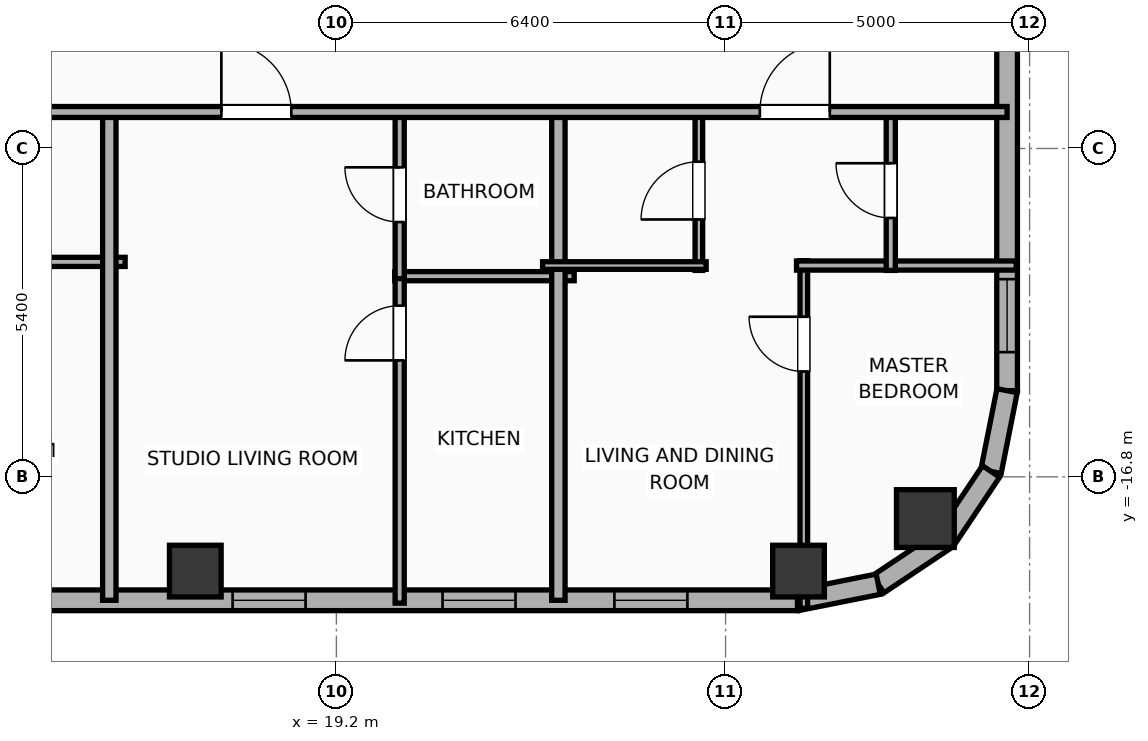
"""IFC4 building model, lengths in metres.
Left out: names, types, materials, properties, quantities, classifications, styles, units other than length and angle.
Written with IfcOpenShell. Run it as: python <this file> out.ifc"""

import sys

from ifc_helpers import new_model, si_unit, direction, frame, frame_2d, origin, origin_2d, place, context, subcontext, project, spatial, rectangle, hollow_rectangle, hollow_circle, extrude, element, fill, save


model = new_model("IFC4")
c1 = context("Model", 3, precision=1e-05, world=origin(), true_north=direction((0.0, 1.0)))
c2 = subcontext(c1, "Body", "Model", "MODEL_VIEW")
j1 = project(units=[si_unit("LENGTHUNIT", "METRE"), si_unit("PLANEANGLEUNIT", "RADIAN")], contexts=[c1])
p1 = place(None, origin())
s1 = spatial("IfcSite", under=j1, at=p1, CompositionType="ELEMENT")
p2 = place(p1, origin())
s2 = spatial("IfcBuilding", under=s1, at=p2, CompositionType="ELEMENT")
p3 = place(p2, frame((0.0, 0.0, 223.6)))
s3 = spatial("IfcBuildingStorey", under=s2, at=p3, CompositionType="ELEMENT", Elevation=223.6)
for number, where, z_axis, x_axis in (
    (1, (16.88, -18.35, 0.0), (0.0, 0.0, 1.0), (1.0, 0.0, 0.0)),
    (2, (26.8, -18.35, 0.0), (0.0, 0.0, 1.0), (1.0, 0.0, 0.0)),
):
    element("IfcColumn", number, at=place(p3, frame(where, z_axis=z_axis, x_axis=x_axis)), inside=s3, PredefinedType="COLUMN", context=c2, shape_type="SweptSolid", body=[
        extrude(hollow_rectangle(XDim=0.85, YDim=0.85, WallThickness=0.028, at=origin_2d()), origin(), (0.0, 0.0, 1.0), 3.9),
    ])
p4 = place(p3, frame((28.886, -17.486, 0.0), z_axis=(0.0, 0.0, 1.0), x_axis=(1.0, 0.0, 0.0)))
e3 = element("IfcColumn", 3, at=p4, inside=s3, PredefinedType="COLUMN", context=c2, shape_type="SweptSolid", body=[
    extrude(hollow_circle(Radius=0.475, WallThickness=0.032, at=origin_2d()), origin(), (0.0, 0.0, 1.0), 3.9),
])
p5 = place(p3, frame((26.783, -18.83, 0.0), z_axis=(0.0, 0.0, 1.0), x_axis=(-1.0, 0.0, 0.0)))
e4 = element("IfcWall", 4, at=p5, inside=s3, PredefinedType="ELEMENTEDWALL", context=c2, shape_type="SweptSolid", body=[
    extrude(rectangle(XDim=49.566, YDim=0.34, at=frame_2d((24.783, 0.0))), origin(), (0.0, 0.0, 1.0), 3.65),
])
p6 = place(p5, frame((23.583, 0.0, 0.75)))
e5 = element("IfcOpeningElement", 5, at=p6, cuts=e4, PredefinedType="OPENING", context=c2, shape_type="SweptSolid", body=[
    extrude(rectangle(XDim=2.4, YDim=2.1, at=frame_2d((1.2, 1.05))), frame((0.0, 0.18, 0.0), z_axis=(0.0, -1.0, 0.0), x_axis=(1.0, 0.0, 0.0)), (0.0, 0.0, 1.0), 0.36),
])
p7 = place(p5, frame((41.756, 0.0, 0.75)))
e6 = element("IfcOpeningElement", 6, at=p7, cuts=e4, PredefinedType="OPENING", context=c2, shape_type="SweptSolid", body=[
    extrude(rectangle(XDim=2.4, YDim=2.1, at=frame_2d((1.2, 1.05))), frame((0.0, 0.18, 0.0), z_axis=(0.0, -1.0, 0.0), x_axis=(1.0, 0.0, 0.0)), (0.0, 0.0, 1.0), 0.36),
])
p8 = place(p5, frame((47.222, 0.0, 0.75)))
e7 = element("IfcOpeningElement", 7, at=p8, cuts=e4, PredefinedType="OPENING", context=c2, shape_type="SweptSolid", body=[
    extrude(rectangle(XDim=1.2, YDim=2.05, at=frame_2d((0.6, 1.025))), frame((0.0, 0.18, 0.0), z_axis=(0.0, -1.0, 0.0), x_axis=(1.0, 0.0, 0.0)), (0.0, 0.0, 1.0), 0.36),
])
p9 = place(p5, frame((45.08, 0.0, 0.75)))
e8 = element("IfcOpeningElement", 8, at=p9, cuts=e4, PredefinedType="OPENING", context=c2, shape_type="SweptSolid", body=[
    extrude(rectangle(XDim=1.2, YDim=2.05, at=frame_2d((0.6, 1.025))), frame((0.0, 0.18, 0.0), z_axis=(0.0, -1.0, 0.0), x_axis=(1.0, 0.0, 0.0)), (0.0, 0.0, 1.0), 0.36),
])
p10 = place(p5, frame((37.289, 0.0, 0.75)))
e9 = element("IfcOpeningElement", 9, at=p10, cuts=e4, PredefinedType="OPENING", context=c2, shape_type="SweptSolid", body=[
    extrude(rectangle(XDim=1.2, YDim=2.05, at=frame_2d((0.6, 1.025))), frame((0.0, 0.18, 0.0), z_axis=(0.0, -1.0, 0.0), x_axis=(1.0, 0.0, 0.0)), (0.0, 0.0, 1.0), 0.36),
])
p11 = place(p5, frame((16.115, 0.0, 0.75)))
e10 = element("IfcOpeningElement", 10, at=p11, cuts=e4, PredefinedType="OPENING", context=c2, shape_type="SweptSolid", body=[
    extrude(rectangle(XDim=1.2, YDim=2.05, at=frame_2d((0.6, 1.025))), frame((0.0, 0.18, 0.0), z_axis=(0.0, -1.0, 0.0), x_axis=(1.0, 0.0, 0.0)), (0.0, 0.0, 1.0), 0.36),
])
p12 = place(p5, frame((12.422, 0.0, 0.75)))
e11 = element("IfcOpeningElement", 11, at=p12, cuts=e4, PredefinedType="OPENING", context=c2, shape_type="SweptSolid", body=[
    extrude(rectangle(XDim=1.2, YDim=2.05, at=frame_2d((0.6, 1.025))), frame((0.0, 0.18, 0.0), z_axis=(0.0, -1.0, 0.0), x_axis=(1.0, 0.0, 0.0)), (0.0, 0.0, 1.0), 0.36),
])
p13 = place(p5, frame((8.09, 0.0, 0.75)))
e12 = element("IfcOpeningElement", 12, at=p13, cuts=e4, PredefinedType="OPENING", context=c2, shape_type="SweptSolid", body=[
    extrude(rectangle(XDim=1.2, YDim=2.05, at=frame_2d((0.6, 1.025))), frame((0.0, 0.18, 0.0), z_axis=(0.0, -1.0, 0.0), x_axis=(1.0, 0.0, 0.0)), (0.0, 0.0, 1.0), 0.36),
])
p14 = place(p5, frame((4.637, 0.0, 0.75)))
e13 = element("IfcOpeningElement", 13, at=p14, cuts=e4, PredefinedType="OPENING", context=c2, shape_type="SweptSolid", body=[
    extrude(rectangle(XDim=1.2, YDim=2.05, at=frame_2d((0.6, 1.025))), frame((0.0, 0.18, 0.0), z_axis=(0.0, -1.0, 0.0), x_axis=(1.0, 0.0, 0.0)), (0.0, 0.0, 1.0), 0.36),
])
p15 = place(p5, frame((1.811, 0.0, 0.75)))
e14 = element("IfcOpeningElement", 14, at=p15, cuts=e4, PredefinedType="OPENING", context=c2, shape_type="SweptSolid", body=[
    extrude(rectangle(XDim=1.2, YDim=2.05, at=frame_2d((0.6, 1.025))), frame((0.0, 0.18, 0.0), z_axis=(0.0, -1.0, 0.0), x_axis=(1.0, 0.0, 0.0)), (0.0, 0.0, 1.0), 0.36),
])
p16 = place(p5, frame((32.253, 0.0, 0.75)))
e15 = element("IfcOpeningElement", 15, at=p16, cuts=e4, PredefinedType="OPENING", context=c2, shape_type="SweptSolid", body=[
    extrude(rectangle(XDim=1.2, YDim=2.05, at=frame_2d((0.6, 1.025))), frame((0.0, 0.18, 0.0), z_axis=(0.0, -1.0, 0.0), x_axis=(1.0, 0.0, 0.0)), (0.0, 0.0, 1.0), 0.36),
])
p17 = place(p5, frame((27.853, 0.0, 0.75)))
e16 = element("IfcOpeningElement", 16, at=p17, cuts=e4, PredefinedType="OPENING", context=c2, shape_type="SweptSolid", body=[
    extrude(rectangle(XDim=1.2, YDim=2.05, at=frame_2d((0.6, 1.025))), frame((0.0, 0.18, 0.0), z_axis=(0.0, -1.0, 0.0), x_axis=(1.0, 0.0, 0.0)), (0.0, 0.0, 1.0), 0.36),
])
p18 = place(p5, frame((20.473, 0.0, 0.75)))
e17 = element("IfcOpeningElement", 17, at=p18, cuts=e4, PredefinedType="OPENING", context=c2, shape_type="SweptSolid", body=[
    extrude(rectangle(XDim=1.2, YDim=2.05, at=frame_2d((0.6, 1.025))), frame((0.0, 0.18, 0.0), z_axis=(0.0, -1.0, 0.0), x_axis=(1.0, 0.0, 0.0)), (0.0, 0.0, 1.0), 0.36),
])
p19 = place(p3, frame((30.23, 16.583, 0.0), z_axis=(0.0, 0.0, 1.0), x_axis=(0.0, -1.0, 0.0)))
e18 = element("IfcWall", 18, at=p19, inside=s3, PredefinedType="ELEMENTEDWALL", context=c2, shape_type="SweptSolid", body=[
    extrude(rectangle(XDim=31.967, YDim=0.34, at=frame_2d((15.983, 0.0))), origin(), (0.0, 0.0, 1.0), 3.65),
])
p20 = place(p19, frame((30.132, 0.0, 0.75)))
e19 = element("IfcOpeningElement", 19, at=p20, cuts=e18, PredefinedType="OPENING", context=c2, shape_type="SweptSolid", body=[
    extrude(rectangle(XDim=1.2, YDim=2.05, at=frame_2d((0.6, 1.025))), frame((0.0, 0.18, 0.0), z_axis=(0.0, -1.0, 0.0), x_axis=(1.0, 0.0, 0.0)), (0.0, 0.0, 1.0), 0.36),
])
p21 = place(p19, frame((11.288, 0.0, 0.75)))
e20 = element("IfcOpeningElement", 20, at=p21, cuts=e18, PredefinedType="OPENING", context=c2, shape_type="SweptSolid", body=[
    extrude(rectangle(XDim=1.2, YDim=2.05, at=frame_2d((0.6, 1.025))), frame((0.0, 0.18, 0.0), z_axis=(0.0, -1.0, 0.0), x_axis=(1.0, 0.0, 0.0)), (0.0, 0.0, 1.0), 0.36),
])
p22 = place(p19, frame((20.538, 0.0, 0.75)))
e21 = element("IfcOpeningElement", 21, at=p22, cuts=e18, PredefinedType="OPENING", context=c2, shape_type="SweptSolid", body=[
    extrude(rectangle(XDim=1.2, YDim=2.05, at=frame_2d((0.6, 1.025))), frame((0.0, 0.18, 0.0), z_axis=(0.0, -1.0, 0.0), x_axis=(1.0, 0.0, 0.0)), (0.0, 0.0, 1.0), 0.36),
])
p23 = place(p3, frame((30.23, -15.383, 0.0), z_axis=(0.0, 0.0, 1.0), x_axis=(-0.195110379894, -0.98078129043, 0.0)))
e22 = element("IfcWall", 22, at=p23, inside=s3, PredefinedType="ELEMENTEDWALL", context=c2, shape_type="SweptSolid", body=[
    extrude(rectangle(XDim=1.354, YDim=0.34, at=frame_2d((0.677, 0.0))), origin(), (0.0, 0.0, 1.0), 3.65),
])
p24 = place(p3, frame((29.966, -16.711, 0.0), z_axis=(0.0, 0.0, 1.0), x_axis=(-0.555584683399, -0.831459956686, 0.0)))
e23 = element("IfcWall", 23, at=p24, inside=s3, PredefinedType="ELEMENTEDWALL", context=c2, shape_type="SweptSolid", body=[
    extrude(rectangle(XDim=1.337, YDim=0.34, at=frame_2d((0.668, 0.0))), origin(), (0.0, 0.0, 1.0), 3.65),
])
p25 = place(p3, frame((29.223, -17.823, 0.0), z_axis=(0.0, 0.0, 1.0), x_axis=(-0.831403586725, -0.555669034571, 0.0)))
e24 = element("IfcWall", 24, at=p25, inside=s3, PredefinedType="ELEMENTEDWALL", context=c2, shape_type="SweptSolid", body=[
    extrude(rectangle(XDim=1.337, YDim=0.34, at=frame_2d((0.668, 0.0))), origin(), (0.0, 0.0, 1.0), 3.65),
])
p26 = place(p3, frame((28.111, -18.566, 0.0), z_axis=(0.0, 0.0, 1.0), x_axis=(-0.980788153188, -0.195075878998, 0.0)))
e25 = element("IfcWall", 25, at=p26, inside=s3, PredefinedType="ELEMENTEDWALL", context=c2, shape_type="SweptSolid", body=[
    extrude(rectangle(XDim=1.354, YDim=0.34, at=frame_2d((0.677, 0.0))), origin(), (0.0, 0.0, 1.0), 3.65),
])
p27 = place(p3, frame((11.936, -13.265, 0.0), z_axis=(0.0, 0.0, 1.0), x_axis=(1.0, 0.0, 0.0)))
e26 = element("IfcWall", 26, at=p27, inside=s3, PredefinedType="PLUMBINGWALL", context=c2, shape_type="SweptSolid", body=[
    extrude(rectangle(XDim=3.79, YDim=0.15, at=frame_2d((1.895, 0.0))), origin(), (0.0, 0.0, 1.0), 3.65),
])
p28 = place(p3, frame((15.466, -18.83, 0.0), z_axis=(0.0, 0.0, 1.0), x_axis=(0.0, 1.0, 0.0)))
e27 = element("IfcWall", 27, at=p28, inside=s3, PredefinedType="PARTITIONING", context=c2, shape_type="SweptSolid", body=[
    extrude(rectangle(XDim=8.11, YDim=0.22, at=frame_2d((4.055, 0.0))), origin(), (0.0, 0.0, 1.0), 3.65),
])
p29 = place(p3, frame((20.161, -13.5, 0.0), z_axis=(0.0, 0.0, 1.0), x_axis=(1.0, 0.0, 0.0)))
e28 = element("IfcWall", 28, at=p29, inside=s3, PredefinedType="PLUMBINGWALL", context=c2, shape_type="SweptSolid", body=[
    extrude(rectangle(XDim=2.95, YDim=0.15, at=frame_2d((1.475, 0.0))), origin(), (0.0, 0.0, 1.0), 3.65),
])
p30 = place(p3, frame((20.241, -18.877, 0.0), z_axis=(0.0, 0.0, 1.0), x_axis=(0.0, 1.0, 0.0)))
e29 = element("IfcWall", 29, at=p30, inside=s3, PredefinedType="PLUMBINGWALL", context=c2, shape_type="SweptSolid", body=[
    extrude(rectangle(XDim=5.417, YDim=0.15, at=frame_2d((2.708, 0.0))), origin(), (0.0, 0.0, 1.0), 3.65),
])
p31 = place(p30, frame((3.992, 0.0, 0.0)))
e30 = element("IfcOpeningElement", 30, at=p31, cuts=e29, PredefinedType="OPENING", context=c2, shape_type="SweptSolid", body=[
    extrude(rectangle(XDim=0.9, YDim=2.05, at=frame_2d((0.45, 1.025))), frame((0.0, 0.085, 0.0), z_axis=(0.0, -1.0, 0.0), x_axis=(1.0, 0.0, 0.0)), (0.0, 0.0, 1.0), 0.17),
])
p32 = place(p3, frame((20.241, -13.54, 0.0), z_axis=(0.0, 0.0, 1.0), x_axis=(0.0, 1.0, 0.0)))
e31 = element("IfcWall", 31, at=p32, inside=s3, PredefinedType="PLUMBINGWALL", context=c2, shape_type="SweptSolid", body=[
    extrude(rectangle(XDim=2.76, YDim=0.15, at=frame_2d((1.38, 0.0))), origin(), (0.0, 0.0, 1.0), 3.65),
])
p33 = place(p32, frame((0.93, 0.0, 0.0)))
e32 = element("IfcOpeningElement", 32, at=p33, cuts=e31, PredefinedType="OPENING", context=c2, shape_type="SweptSolid", body=[
    extrude(rectangle(XDim=0.9, YDim=2.05, at=frame_2d((0.45, 1.025))), frame((0.0, 0.085, 0.0), z_axis=(0.0, -1.0, 0.0), x_axis=(1.0, 0.0, 0.0)), (0.0, 0.0, 1.0), 0.17),
])
p34 = place(p3, frame((22.851, -18.83, 0.0), z_axis=(0.0, 0.0, 1.0), x_axis=(0.0, 1.0, 0.0)))
e33 = element("IfcWall", 33, at=p34, inside=s3, PredefinedType="PARTITIONING", context=c2, shape_type="SweptSolid", body=[
    extrude(rectangle(XDim=8.11, YDim=0.22, at=frame_2d((4.055, 0.0))), origin(), (0.0, 0.0, 1.0), 3.65),
])
p35 = place(p3, frame((26.887, -18.962, 0.0), z_axis=(0.0, 0.0, 1.0), x_axis=(0.0, 1.0, 0.0)))
e34 = element("IfcWall", 34, at=p35, inside=s3, PredefinedType="PARTITIONING", context=c2, shape_type="SweptSolid", body=[
    extrude(rectangle(XDim=5.717, YDim=0.125, at=frame_2d((2.859, 0.0))), origin(), (0.0, 0.0, 1.0), 3.65),
])
p36 = place(p35, frame((3.895, 0.0, 0.0)))
e35 = element("IfcOpeningElement", 35, at=p36, cuts=e34, PredefinedType="OPENING", context=c2, shape_type="SweptSolid", body=[
    extrude(rectangle(XDim=0.9, YDim=2.05, at=frame_2d((0.45, 1.025))), frame((0.0, 0.073, 0.0), z_axis=(0.0, -1.0, 0.0), x_axis=(1.0, 0.0, 0.0)), (0.0, 0.0, 1.0), 0.145),
])
p37 = place(p3, frame((26.767, -13.325, 0.0), z_axis=(0.0, 0.0, 1.0), x_axis=(1.0, 0.0, 0.0)))
e36 = element("IfcWall", 36, at=p37, inside=s3, PredefinedType="PLUMBINGWALL", context=c2, shape_type="SweptSolid", body=[
    extrude(rectangle(XDim=3.613, YDim=0.15, at=frame_2d((1.806, 0.0))), origin(), (0.0, 0.0, 1.0), 3.65),
])
p38 = place(p3, frame((25.161, -13.405, 0.0), z_axis=(0.0, 0.0, 1.0), x_axis=(0.0, 1.0, 0.0)))
e37 = element("IfcWall", 37, at=p38, inside=s3, PredefinedType="PARTITIONING", context=c2, shape_type="SweptSolid", body=[
    extrude(rectangle(XDim=2.625, YDim=0.125, at=frame_2d((1.312, 0.0))), origin(), (0.0, 0.0, 1.0), 3.65),
])
p39 = place(p38, frame((0.837, 0.0, 0.0)))
e38 = element("IfcOpeningElement", 38, at=p39, cuts=e37, PredefinedType="OPENING", context=c2, shape_type="SweptSolid", body=[
    extrude(rectangle(XDim=0.95, YDim=2.05, at=frame_2d((0.475, 1.025))), frame((0.0, 0.073, 0.0), z_axis=(0.0, -1.0, 0.0), x_axis=(1.0, 0.0, 0.0)), (0.0, 0.0, 1.0), 0.145),
])
p40 = place(p3, frame((22.591, -13.325, 0.0), z_axis=(0.0, 0.0, 1.0), x_axis=(1.0, 0.0, 0.0)))
e39 = element("IfcWall", 39, at=p40, inside=s3, PredefinedType="PARTITIONING", context=c2, shape_type="SweptSolid", body=[
    extrude(rectangle(XDim=2.69, YDim=0.125, at=frame_2d((1.345, 0.0))), origin(), (0.0, 0.0, 1.0), 3.65),
])
p41 = place(p3, frame((28.317, -13.405, 0.0), z_axis=(0.0, 0.0, 1.0), x_axis=(0.0, 1.0, 0.0)))
e40 = element("IfcWall", 40, at=p41, inside=s3, PredefinedType="PLUMBINGWALL", context=c2, shape_type="SweptSolid", body=[
    extrude(rectangle(XDim=2.625, YDim=0.15, at=frame_2d((1.312, 0.0))), origin(), (0.0, 0.0, 1.0), 3.65),
])
p42 = place(p41, frame((0.863, 0.0, 0.0)))
e41 = element("IfcOpeningElement", 41, at=p42, cuts=e40, PredefinedType="OPENING", context=c2, shape_type="SweptSolid", body=[
    extrude(rectangle(XDim=0.9, YDim=2.05, at=frame_2d((0.45, 1.025))), frame((0.0, 0.085, 0.0), z_axis=(0.0, -1.0, 0.0), x_axis=(1.0, 0.0, 0.0)), (0.0, 0.0, 1.0), 0.17),
])
p43 = place(p3, frame((8.08, -10.8, 0.0), z_axis=(0.0, 0.0, 1.0), x_axis=(1.0, 0.0, 0.0)))
e42 = element("IfcWall", 42, at=p43, inside=s3, PredefinedType="PARTITIONING", context=c2, shape_type="SweptSolid", body=[
    extrude(rectangle(XDim=22.15, YDim=0.18, at=frame_2d((11.075, 0.0))), origin(), (0.0, 0.0, 1.0), 3.65),
])
p44 = place(p43, frame((3.283, 0.0, 0.0)))
e43 = element("IfcOpeningElement", 43, at=p44, cuts=e42, PredefinedType="OPENING", context=c2, shape_type="SweptSolid", body=[
    extrude(rectangle(XDim=1.15, YDim=2.05, at=frame_2d((0.575, 1.025))), frame((0.0, 0.1, 0.0), z_axis=(0.0, -1.0, 0.0), x_axis=(1.0, 0.0, 0.0)), (0.0, 0.0, 1.0), 0.2),
])
p45 = place(p43, frame((9.229, 0.0, 0.0)))
e44 = element("IfcOpeningElement", 44, at=p45, cuts=e42, PredefinedType="OPENING", context=c2, shape_type="SweptSolid", body=[
    extrude(rectangle(XDim=1.15, YDim=2.05, at=frame_2d((0.575, 1.025))), frame((0.0, 0.1, 0.0), z_axis=(0.0, -1.0, 0.0), x_axis=(1.0, 0.0, 0.0)), (0.0, 0.0, 1.0), 0.2),
])
p46 = place(p43, frame((18.084, 0.0, 0.0)))
e45 = element("IfcOpeningElement", 45, at=p46, cuts=e42, PredefinedType="OPENING", context=c2, shape_type="SweptSolid", body=[
    extrude(rectangle(XDim=1.15, YDim=2.05, at=frame_2d((0.575, 1.025))), frame((0.0, 0.1, 0.0), z_axis=(0.0, -1.0, 0.0), x_axis=(1.0, 0.0, 0.0)), (0.0, 0.0, 1.0), 0.2),
])
p47 = place(p13, origin())
e46 = element("IfcWindow", 46, at=p47, inside=s3, PartitioningType="SINGLE_PANEL", PredefinedType="WINDOW", context=c2, shape_type="SweptSolid", body=[
    extrude(rectangle(XDim=1.2, YDim=2.05, at=frame_2d((0.6, 1.025))), frame((0.0, 0.03, 0.0), z_axis=(0.0, -1.0, 0.0), x_axis=(1.0, 0.0, 0.0)), (0.0, 0.0, 1.0), 0.06),
])
fill(e12, e46)
p48 = place(p14, origin())
e47 = element("IfcWindow", 47, at=p48, inside=s3, PartitioningType="SINGLE_PANEL", PredefinedType="WINDOW", context=c2, shape_type="SweptSolid", body=[
    extrude(rectangle(XDim=1.2, YDim=2.05, at=frame_2d((0.6, 1.025))), frame((0.0, 0.03, 0.0), z_axis=(0.0, -1.0, 0.0), x_axis=(1.0, 0.0, 0.0)), (0.0, 0.0, 1.0), 0.06),
])
fill(e13, e47)
p49 = place(p15, origin())
e48 = element("IfcWindow", 48, at=p49, inside=s3, PartitioningType="SINGLE_PANEL", PredefinedType="WINDOW", context=c2, shape_type="SweptSolid", body=[
    extrude(rectangle(XDim=1.2, YDim=2.05, at=frame_2d((0.6, 1.025))), frame((0.0, 0.03, 0.0), z_axis=(0.0, -1.0, 0.0), x_axis=(1.0, 0.0, 0.0)), (0.0, 0.0, 1.0), 0.06),
])
fill(e14, e48)
p50 = place(p20, origin())
e49 = element("IfcWindow", 49, at=p50, inside=s3, PartitioningType="SINGLE_PANEL", PredefinedType="WINDOW", context=c2, shape_type="SweptSolid", body=[
    extrude(rectangle(XDim=1.2, YDim=2.05, at=frame_2d((0.6, 1.025))), frame((0.0, 0.03, 0.0), z_axis=(0.0, -1.0, 0.0), x_axis=(1.0, 0.0, 0.0)), (0.0, 0.0, 1.0), 0.06),
])
fill(e19, e49)
p51 = place(p31, origin())
e50 = element("IfcDoor", 50, at=p51, inside=s3, OperationType="SINGLE_SWING_LEFT", PredefinedType="DOOR", context=c2, shape_type="SweptSolid", body=[
    extrude(rectangle(XDim=0.9, YDim=2.05, at=frame_2d((0.45, 1.025))), frame((0.0, 0.025, 0.0), z_axis=(0.0, -1.0, 0.0), x_axis=(1.0, 0.0, 0.0)), (0.0, 0.0, 1.0), 0.05),
])
fill(e30, e50)
p52 = place(p33, origin())
e51 = element("IfcDoor", 51, at=p52, inside=s3, OperationType="SINGLE_SWING_RIGHT", PredefinedType="DOOR", context=c2, shape_type="SweptSolid", body=[
    extrude(rectangle(XDim=0.9, YDim=2.05, at=frame_2d((0.45, 1.025))), frame((0.0, 0.025, 0.0), z_axis=(0.0, -1.0, 0.0), x_axis=(1.0, 0.0, 0.0)), (0.0, 0.0, 1.0), 0.05),
])
fill(e32, e51)
p53 = place(p36, origin())
e52 = element("IfcDoor", 52, at=p53, inside=s3, OperationType="SINGLE_SWING_RIGHT", PredefinedType="DOOR", context=c2, shape_type="SweptSolid", body=[
    extrude(rectangle(XDim=0.9, YDim=2.05, at=frame_2d((0.45, 1.025))), frame((0.0, 0.025, 0.0), z_axis=(0.0, -1.0, 0.0), x_axis=(1.0, 0.0, 0.0)), (0.0, 0.0, 1.0), 0.05),
])
fill(e35, e52)
p54 = place(p39, origin())
e53 = element("IfcDoor", 53, at=p54, inside=s3, OperationType="SINGLE_SWING_LEFT", PredefinedType="DOOR", context=c2, shape_type="SweptSolid", body=[
    extrude(rectangle(XDim=0.95, YDim=2.05, at=frame_2d((0.475, 1.025))), frame((0.0, 0.025, 0.0), z_axis=(0.0, -1.0, 0.0), x_axis=(1.0, 0.0, 0.0)), (0.0, 0.0, 1.0), 0.05),
])
fill(e38, e53)
p55 = place(p42, origin())
e54 = element("IfcDoor", 54, at=p55, inside=s3, OperationType="SINGLE_SWING_RIGHT", PredefinedType="DOOR", context=c2, shape_type="SweptSolid", body=[
    extrude(rectangle(XDim=0.9, YDim=2.05, at=frame_2d((0.45, 1.025))), frame((0.0, 0.025, 0.0), z_axis=(0.0, -1.0, 0.0), x_axis=(1.0, 0.0, 0.0)), (0.0, 0.0, 1.0), 0.05),
])
fill(e41, e54)
p56 = place(p45, origin())
e55 = element("IfcDoor", 55, at=p56, inside=s3, OperationType="SINGLE_SWING_LEFT", PredefinedType="DOOR", context=c2, shape_type="SweptSolid", body=[
    extrude(rectangle(XDim=1.15, YDim=2.05, at=frame_2d((0.575, 1.025))), frame((0.0, 0.025, 0.0), z_axis=(0.0, -1.0, 0.0), x_axis=(1.0, 0.0, 0.0)), (0.0, 0.0, 1.0), 0.05),
])
fill(e44, e55)
p57 = place(p46, origin())
e56 = element("IfcDoor", 56, at=p57, inside=s3, OperationType="SINGLE_SWING_RIGHT", PredefinedType="DOOR", context=c2, shape_type="SweptSolid", body=[
    extrude(rectangle(XDim=1.15, YDim=2.05, at=frame_2d((0.575, 1.025))), frame((0.0, 0.025, 0.0), z_axis=(0.0, -1.0, 0.0), x_axis=(1.0, 0.0, 0.0)), (0.0, 0.0, 1.0), 0.05),
])
fill(e45, e56)
save(model, sys.argv[1])
